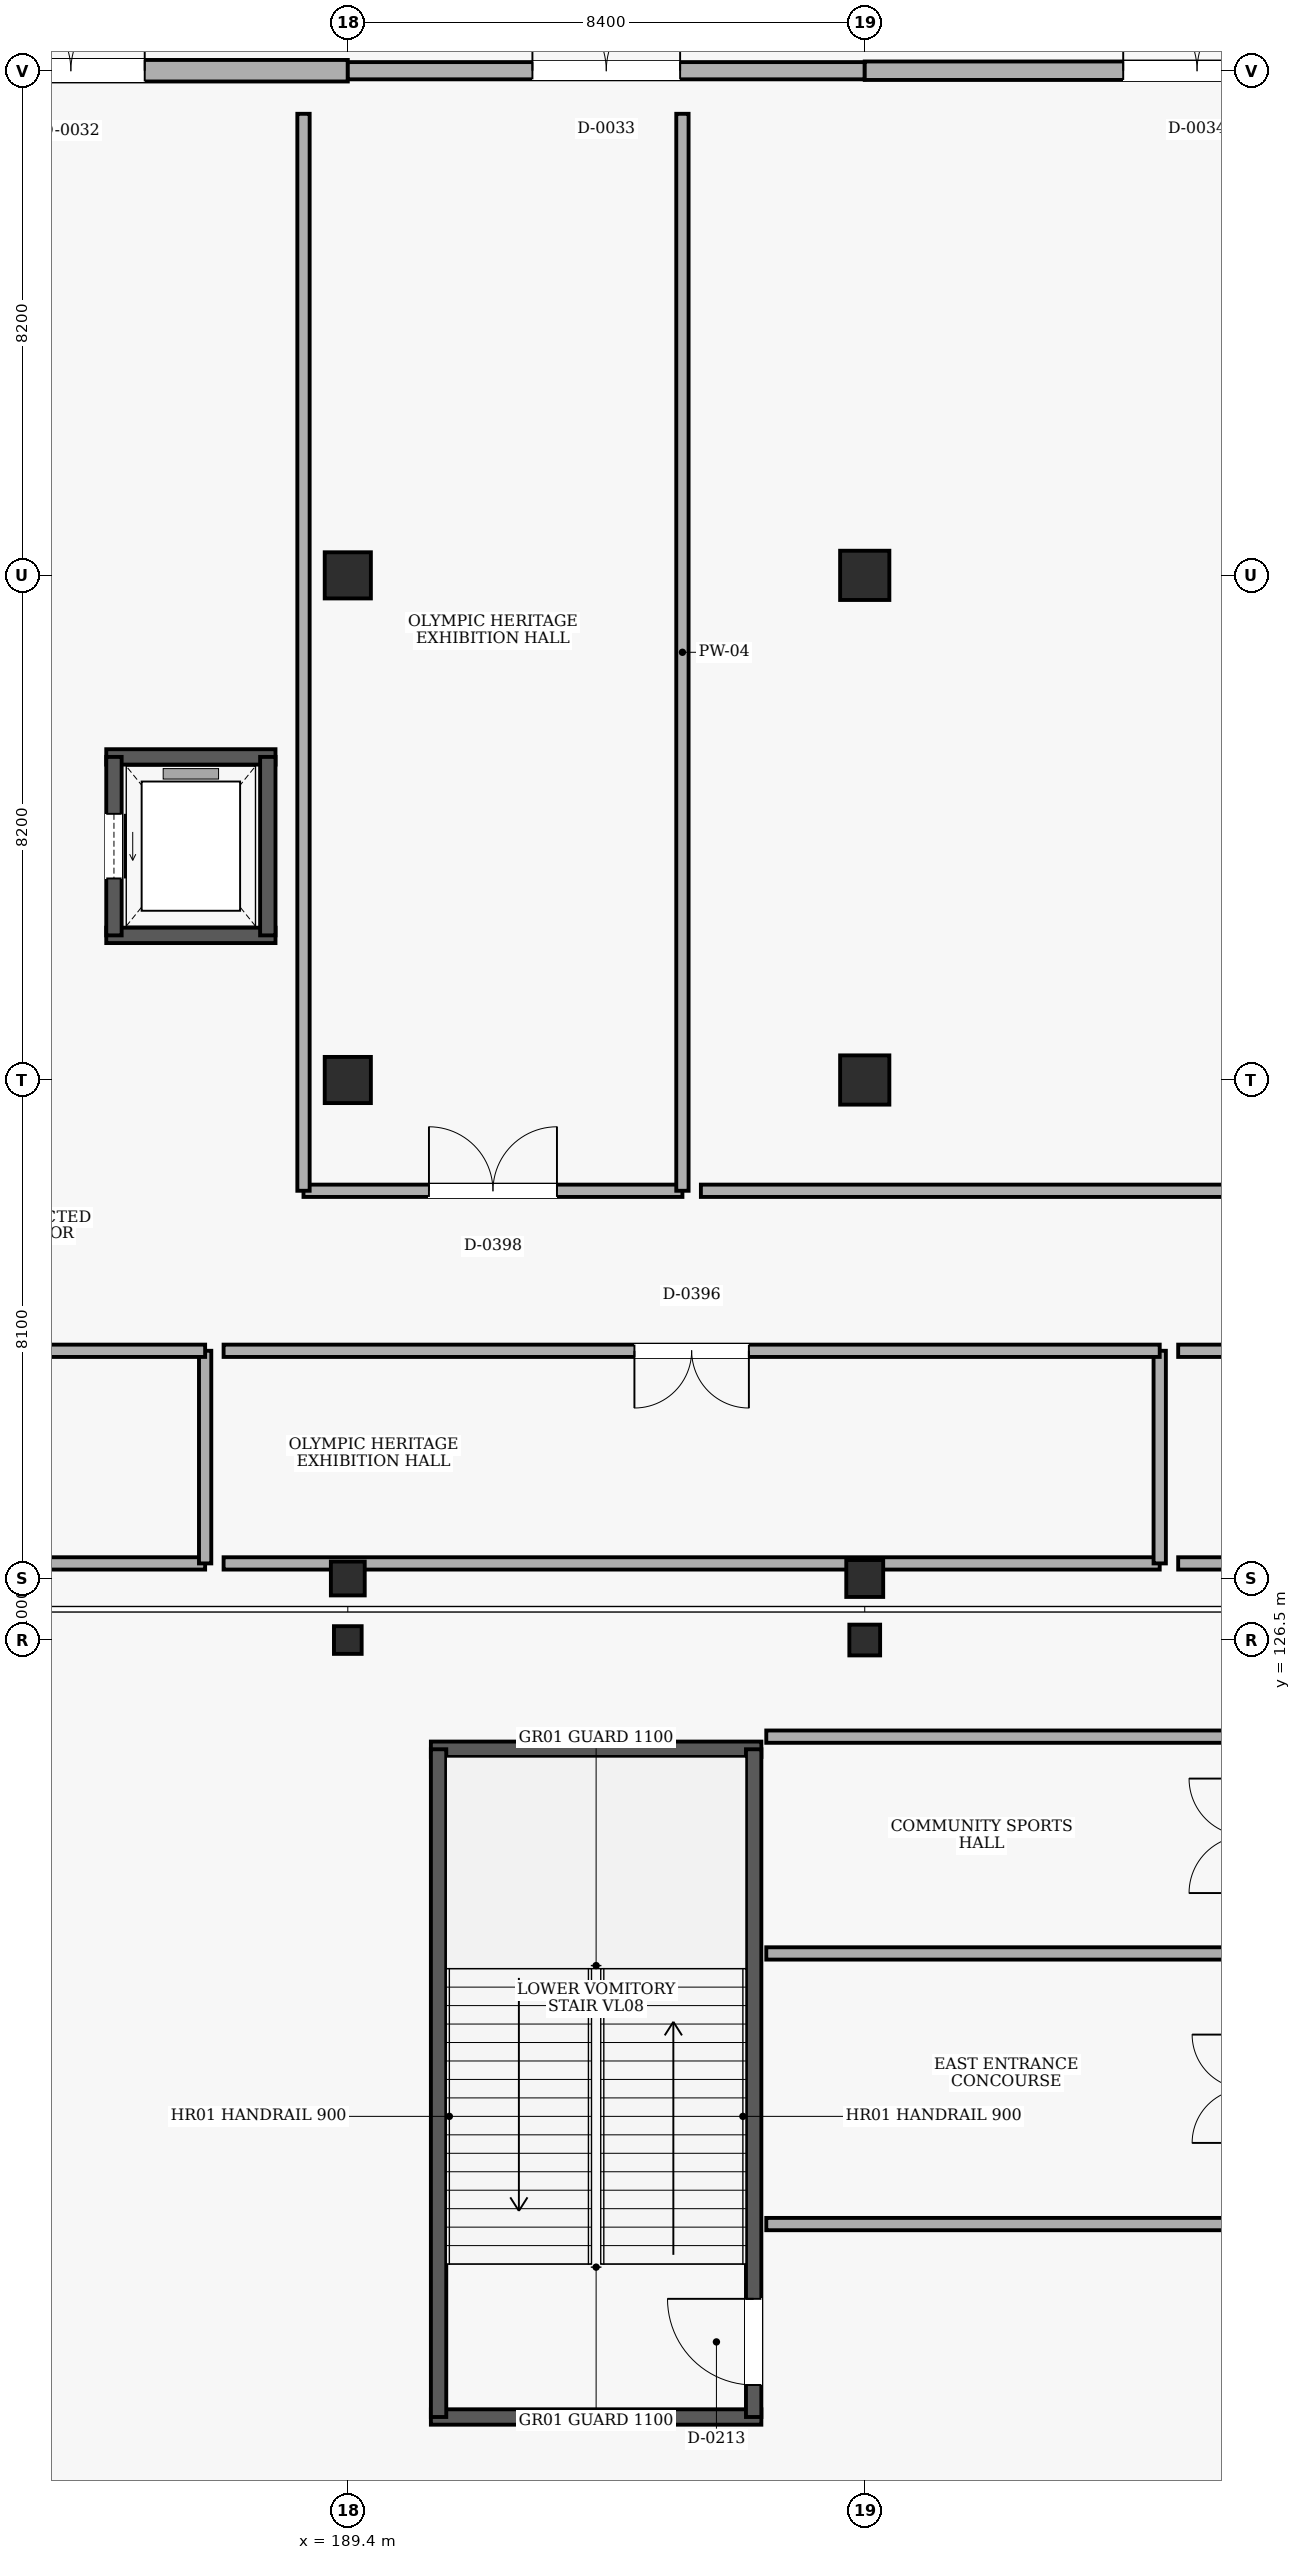
"""IFC4 building model, lengths in metres.
Left out: names, types, materials, properties, quantities, classifications, styles, units other than length and angle.
Written with IfcOpenShell. Run it as: python <this file> out.ifc"""

import sys

from ifc_helpers import new_model, si_unit, direction, frame, frame_2d, origin, origin_2d, place, context, subcontext, project, spatial, rectangle, extrude, element, fill, save


model = new_model("IFC4")
c1 = context("Model", 3, precision=1e-05, world=origin(), true_north=direction((0.0, 1.0)))
c2 = subcontext(c1, "Body", "Model", "MODEL_VIEW")
j1 = project(units=[si_unit("LENGTHUNIT", "METRE"), si_unit("PLANEANGLEUNIT", "RADIAN")], contexts=[c1])
p1 = place(None, origin())
s1 = spatial("IfcSite", under=j1, at=p1, CompositionType="ELEMENT")
p2 = place(p1, origin())
s2 = spatial("IfcBuilding", under=s1, at=p2, CompositionType="ELEMENT")
p3 = place(p2, origin())
s3 = spatial("IfcBuildingStorey", under=s2, at=p3, CompositionType="ELEMENT", Elevation=0.0)
p4 = place(p3, frame((189.4, 126.5, 0.0), z_axis=(0.0, 0.0, 1.0), x_axis=(1.0, 0.0, 0.0)))
e1 = element("IfcColumn", 1, at=p4, inside=s3, PredefinedType="COLUMN", context=c2, shape_type="SweptSolid", body=[
    extrude(rectangle(XDim=0.45, YDim=0.45, at=origin_2d()), origin(), (0.0, 0.0, 1.0), 5.4),
])
p5 = place(p3, frame((189.4, 127.5, 0.0), z_axis=(0.0, 0.0, 1.0), x_axis=(1.0, 0.0, 0.0)))
e2 = element("IfcColumn", 2, at=p5, inside=s3, PredefinedType="COLUMN", context=c2, shape_type="SweptSolid", body=[
    extrude(rectangle(XDim=0.55, YDim=0.55, at=origin_2d()), origin(), (0.0, 0.0, 1.0), 5.4),
])
for number, where, z_axis, x_axis in (
    (3, (189.4, 135.6, 0.0), (0.0, 0.0, 1.0), (1.0, 0.0, 0.0)),
    (4, (189.4, 143.8, 0.0), (0.0, 0.0, 1.0), (1.0, 0.0, 0.0)),
):
    element("IfcColumn", number, at=place(p3, frame(where, z_axis=z_axis, x_axis=x_axis)), inside=s3, PredefinedType="COLUMN", context=c2, shape_type="SweptSolid", body=[
        extrude(rectangle(XDim=0.75, YDim=0.75, at=origin_2d()), origin(), (0.0, 0.0, 1.0), 5.4),
    ])
p6 = place(p3, frame((197.8, 126.5, 0.0), z_axis=(0.0, 0.0, 1.0), x_axis=(1.0, 0.0, 0.0)))
e5 = element("IfcColumn", 5, at=p6, inside=s3, PredefinedType="COLUMN", context=c2, shape_type="SweptSolid", body=[
    extrude(rectangle(XDim=0.5, YDim=0.5, at=origin_2d()), origin(), (0.0, 0.0, 1.0), 5.4),
])
p7 = place(p3, frame((197.8, 127.5, 0.0), z_axis=(0.0, 0.0, 1.0), x_axis=(1.0, 0.0, 0.0)))
e6 = element("IfcColumn", 6, at=p7, inside=s3, PredefinedType="COLUMN", context=c2, shape_type="SweptSolid", body=[
    extrude(rectangle(XDim=0.6, YDim=0.6, at=origin_2d()), origin(), (0.0, 0.0, 1.0), 5.4),
])
for number, where, z_axis, x_axis in (
    (7, (197.8, 135.6, 0.0), (0.0, 0.0, 1.0), (1.0, 0.0, 0.0)),
    (8, (197.8, 143.8, 0.0), (0.0, 0.0, 1.0), (1.0, 0.0, 0.0)),
):
    element("IfcColumn", number, at=place(p3, frame(where, z_axis=z_axis, x_axis=x_axis)), inside=s3, PredefinedType="COLUMN", context=c2, shape_type="SweptSolid", body=[
        extrude(rectangle(XDim=0.8, YDim=0.8, at=origin_2d()), origin(), (0.0, 0.0, 1.0), 5.4),
    ])
p8 = place(p3, frame((180.4, 152.0, 0.0), z_axis=(0.0, 0.0, 1.0), x_axis=(1.0, 0.0, 0.0)))
e9 = element("IfcWall", 9, at=p8, inside=s3, PredefinedType="SOLIDWALL", context=c2, shape_type="SweptSolid", body=[
    extrude(rectangle(XDim=9.0, YDim=0.35, at=frame_2d((4.5, 0.0))), origin(), (0.0, 0.0, 1.0), 5.08),
])
p9 = place(p8, frame((3.3, 0.0, 0.0)))
e10 = element("IfcOpeningElement", 10, at=p9, cuts=e9, PredefinedType="OPENING", context=c2, shape_type="SweptSolid", body=[
    extrude(rectangle(XDim=2.4, YDim=2.2, at=frame_2d((1.2, 1.1))), frame((0.0, 0.185, 0.0), z_axis=(0.0, -1.0, 0.0), x_axis=(1.0, 0.0, 0.0)), (0.0, 0.0, 1.0), 0.37),
])
p10 = place(p3, frame((189.4, 152.0, 0.0), z_axis=(0.0, 0.0, 1.0), x_axis=(1.0, 0.0, 0.0)))
e11 = element("IfcWall", 11, at=p10, inside=s3, PredefinedType="SOLIDWALL", context=c2, shape_type="SweptSolid", body=[
    extrude(rectangle(XDim=8.4, YDim=0.28, at=frame_2d((4.2, 0.0))), origin(), (0.0, 0.0, 1.0), 5.08),
])
p11 = place(p10, frame((3.0, 0.0, 0.0)))
e12 = element("IfcOpeningElement", 12, at=p11, cuts=e11, PredefinedType="OPENING", context=c2, shape_type="SweptSolid", body=[
    extrude(rectangle(XDim=2.4, YDim=2.2, at=frame_2d((1.2, 1.1))), frame((0.0, 0.15, 0.0), z_axis=(0.0, -1.0, 0.0), x_axis=(1.0, 0.0, 0.0)), (0.0, 0.0, 1.0), 0.3),
])
p12 = place(p3, frame((197.8, 152.0, 0.0), z_axis=(0.0, 0.0, 1.0), x_axis=(1.0, 0.0, 0.0)))
e13 = element("IfcWall", 13, at=p12, inside=s3, PredefinedType="SOLIDWALL", context=c2, shape_type="SweptSolid", body=[
    extrude(rectangle(XDim=10.8, YDim=0.3, at=frame_2d((5.4, 0.0))), origin(), (0.0, 0.0, 1.0), 5.08),
])
p13 = place(p12, frame((4.2, 0.0, 0.0)))
e14 = element("IfcOpeningElement", 14, at=p13, cuts=e13, PredefinedType="OPENING", context=c2, shape_type="SweptSolid", body=[
    extrude(rectangle(XDim=2.4, YDim=2.2, at=frame_2d((1.2, 1.1))), frame((0.0, 0.16, 0.0), z_axis=(0.0, -1.0, 0.0), x_axis=(1.0, 0.0, 0.0)), (0.0, 0.0, 1.0), 0.32),
])
for number, where, z_axis, x_axis in (
    (15, (190.75, 113.875, 0.0), (0.0, 0.0, 1.0), (1.0, 0.0, 0.0)),
    (16, (196.12, 124.725, 0.0), (0.0, 0.0, 1.0), (-1.0, 0.0, 0.0)),
):
    element("IfcWall", number, at=place(p3, frame(where, z_axis=z_axis, x_axis=x_axis)), inside=s3, PredefinedType="SHEAR", context=c2, shape_type="SweptSolid", body=[
        extrude(rectangle(XDim=5.37, YDim=0.25, at=frame_2d((2.685, 0.0))), origin(), (0.0, 0.0, 1.0), 5.08),
    ])
p14 = place(p3, frame((190.875, 113.875, 0.0), z_axis=(0.0, 0.0, 1.0), x_axis=(0.0, 1.0, 0.0)))
e17 = element("IfcWall", 17, at=p14, inside=s3, PredefinedType="SHEAR", context=c2, shape_type="SweptSolid", body=[
    extrude(rectangle(XDim=10.85, YDim=0.25, at=frame_2d((5.425, 0.0))), origin(), (0.0, 0.0, 1.0), 5.08),
])
p15 = place(p3, frame((195.995, 113.875, 0.0), z_axis=(0.0, 0.0, 1.0), x_axis=(0.0, 1.0, 0.0)))
e18 = element("IfcWall", 18, at=p15, inside=s3, PredefinedType="SHEAR", context=c2, shape_type="SweptSolid", body=[
    extrude(rectangle(XDim=10.85, YDim=0.25, at=frame_2d((5.425, 0.0))), origin(), (0.0, 0.0, 1.0), 5.08),
])
p16 = place(p15, frame((0.52, 0.0, 0.0)))
e19 = element("IfcOpeningElement", 19, at=p16, cuts=e18, PredefinedType="OPENING", context=c2, shape_type="SweptSolid", body=[
    extrude(rectangle(XDim=1.4, YDim=2.15, at=frame_2d((0.7, 1.075))), frame((0.0, 0.135, 0.0), z_axis=(0.0, -1.0, 0.0), x_axis=(1.0, 0.0, 0.0)), (0.0, 0.0, 1.0), 0.27),
])
for number, where, z_axis, x_axis in (
    (20, (185.475, 137.95, 0.0), (0.0, 0.0, 1.0), (1.0, 0.0, 0.0)),
    (21, (188.225, 140.85, 0.0), (0.0, 0.0, 1.0), (-1.0, 0.0, 0.0)),
):
    element("IfcWall", number, at=place(p3, frame(where, z_axis=z_axis, x_axis=x_axis)), inside=s3, PredefinedType="SHEAR", context=c2, shape_type="SweptSolid", body=[
        extrude(rectangle(XDim=2.75, YDim=0.25, at=frame_2d((1.375, 0.0))), origin(), (0.0, 0.0, 1.0), 5.08),
    ])
p17 = place(p3, frame((185.6, 140.85, 0.0), z_axis=(0.0, 0.0, 1.0), x_axis=(0.0, -1.0, 0.0)))
e22 = element("IfcWall", 22, at=p17, inside=s3, PredefinedType="SHEAR", context=c2, shape_type="SweptSolid", body=[
    extrude(rectangle(XDim=2.9, YDim=0.25, at=frame_2d((1.45, 0.0))), origin(), (0.0, 0.0, 1.0), 5.08),
])
p18 = place(p17, frame((0.925, 0.0, 0.0)))
e23 = element("IfcOpeningElement", 23, at=p18, cuts=e22, PredefinedType="OPENING", context=c2, shape_type="SweptSolid", body=[
    extrude(rectangle(XDim=1.05, YDim=2.15, at=frame_2d((0.525, 1.075))), frame((0.0, 0.135, 0.0), z_axis=(0.0, -1.0, 0.0), x_axis=(1.0, 0.0, 0.0)), (0.0, 0.0, 1.0), 0.27),
])
p19 = place(p3, frame((188.1, 137.95, 0.0), z_axis=(0.0, 0.0, 1.0), x_axis=(0.0, 1.0, 0.0)))
e24 = element("IfcWall", 24, at=p19, inside=s3, PredefinedType="SHEAR", context=c2, shape_type="SweptSolid", body=[
    extrude(rectangle(XDim=2.9, YDim=0.25, at=frame_2d((1.45, 0.0))), origin(), (0.0, 0.0, 1.0), 5.08),
])
for number, where, z_axis, x_axis in (
    (25, (196.2, 117.01, 0.0), (0.0, 0.0, 1.0), (1.0, 0.0, 0.0)),
    (26, (204.0, 121.407, 0.0), (0.0, 0.0, 1.0), (-1.0, 0.0, 0.0)),
    (27, (204.0, 124.93, 0.0), (0.0, 0.0, 1.0), (-1.0, 0.0, 0.0)),
):
    element("IfcWall", number, at=place(p3, frame(where, z_axis=z_axis, x_axis=x_axis)), inside=s3, PredefinedType="PARTITIONING", context=c2, shape_type="SweptSolid", body=[
        extrude(rectangle(XDim=7.8, YDim=0.2, at=frame_2d((3.9, 0.0))), origin(), (0.0, 0.0, 1.0), 5.08),
    ])
p20 = place(p3, frame((171.87, 127.745, 0.0), z_axis=(0.0, 0.0, 1.0), x_axis=(1.0, 0.0, 0.0)))
e28 = element("IfcWall", 28, at=p20, inside=s3, PredefinedType="PARTITIONING", context=c2, shape_type="SweptSolid", body=[
    extrude(rectangle(XDim=15.212, YDim=0.2, at=frame_2d((7.606, 0.0))), origin(), (0.0, 0.0, 1.0), 4.26),
])
p21 = place(p3, frame((187.082, 127.745, 0.0), z_axis=(0.0, 0.0, 1.0), x_axis=(0.0, 1.0, 0.0)))
e29 = element("IfcWall", 29, at=p21, inside=s3, PredefinedType="PARTITIONING", context=c2, shape_type="SweptSolid", body=[
    extrude(rectangle(XDim=3.455, YDim=0.2, at=frame_2d((1.728, 0.0))), origin(), (0.0, 0.0, 1.0), 5.08),
])
p22 = place(p3, frame((187.082, 131.2, 0.0), z_axis=(0.0, 0.0, 1.0), x_axis=(-1.0, 0.0, 0.0)))
e30 = element("IfcWall", 30, at=p22, inside=s3, PredefinedType="PARTITIONING", context=c2, shape_type="SweptSolid", body=[
    extrude(rectangle(XDim=15.212, YDim=0.2, at=frame_2d((7.606, 0.0))), origin(), (0.0, 0.0, 1.0), 5.08),
])
p23 = place(p22, frame((6.726, 0.0, 0.0)))
e31 = element("IfcOpeningElement", 31, at=p23, cuts=e30, PredefinedType="OPENING", context=c2, shape_type="SweptSolid", body=[
    extrude(rectangle(XDim=1.76, YDim=2.25, at=frame_2d((0.88, 1.125))), frame((0.0, 0.11, 0.0), z_axis=(0.0, -1.0, 0.0), x_axis=(1.0, 0.0, 0.0)), (0.0, 0.0, 1.0), 0.22),
])
p24 = place(p3, frame((187.382, 127.745, 0.0), z_axis=(0.0, 0.0, 1.0), x_axis=(1.0, 0.0, 0.0)))
e32 = element("IfcWall", 32, at=p24, inside=s3, PredefinedType="PARTITIONING", context=c2, shape_type="SweptSolid", body=[
    extrude(rectangle(XDim=15.212, YDim=0.2, at=frame_2d((7.606, 0.0))), origin(), (0.0, 0.0, 1.0), 4.26),
])
p25 = place(p3, frame((202.593, 127.745, 0.0), z_axis=(0.0, 0.0, 1.0), x_axis=(0.0, 1.0, 0.0)))
e33 = element("IfcWall", 33, at=p25, inside=s3, PredefinedType="PARTITIONING", context=c2, shape_type="SweptSolid", body=[
    extrude(rectangle(XDim=3.455, YDim=0.2, at=frame_2d((1.728, 0.0))), origin(), (0.0, 0.0, 1.0), 5.08),
])
p26 = place(p3, frame((202.593, 131.2, 0.0), z_axis=(0.0, 0.0, 1.0), x_axis=(-1.0, 0.0, 0.0)))
e34 = element("IfcWall", 34, at=p26, inside=s3, PredefinedType="PARTITIONING", context=c2, shape_type="SweptSolid", body=[
    extrude(rectangle(XDim=15.212, YDim=0.2, at=frame_2d((7.606, 0.0))), origin(), (0.0, 0.0, 1.0), 5.08),
])
p27 = place(p26, frame((6.676, 0.0, 0.0)))
e35 = element("IfcOpeningElement", 35, at=p27, cuts=e34, PredefinedType="OPENING", context=c2, shape_type="SweptSolid", body=[
    extrude(rectangle(XDim=1.86, YDim=2.3, at=frame_2d((0.93, 1.15))), frame((0.0, 0.11, 0.0), z_axis=(0.0, -1.0, 0.0), x_axis=(1.0, 0.0, 0.0)), (0.0, 0.0, 1.0), 0.22),
])
p28 = place(p3, frame((202.893, 127.745, 0.0), z_axis=(0.0, 0.0, 1.0), x_axis=(1.0, 0.0, 0.0)))
e36 = element("IfcWall", 36, at=p28, inside=s3, PredefinedType="PARTITIONING", context=c2, shape_type="SweptSolid", body=[
    extrude(rectangle(XDim=15.212, YDim=0.2, at=frame_2d((7.606, 0.0))), origin(), (0.0, 0.0, 1.0), 4.21),
])
p29 = place(p3, frame((218.105, 131.2, 0.0), z_axis=(0.0, 0.0, 1.0), x_axis=(-1.0, 0.0, 0.0)))
e37 = element("IfcWall", 37, at=p29, inside=s3, PredefinedType="PARTITIONING", context=c2, shape_type="SweptSolid", body=[
    extrude(rectangle(XDim=15.212, YDim=0.2, at=frame_2d((7.606, 0.0))), origin(), (0.0, 0.0, 1.0), 5.08),
])
p30 = place(p29, frame((6.626, 0.0, 0.0)))
e38 = element("IfcOpeningElement", 38, at=p30, cuts=e37, PredefinedType="OPENING", context=c2, shape_type="SweptSolid", body=[
    extrude(rectangle(XDim=1.96, YDim=2.3, at=frame_2d((0.98, 1.15))), frame((0.0, 0.11, 0.0), z_axis=(0.0, -1.0, 0.0), x_axis=(1.0, 0.0, 0.0)), (0.0, 0.0, 1.0), 0.22),
])
p31 = place(p3, frame((188.68, 133.8, 0.0), z_axis=(0.0, 0.0, 1.0), x_axis=(1.0, 0.0, 0.0)))
e39 = element("IfcWall", 39, at=p31, inside=s3, PredefinedType="PARTITIONING", context=c2, shape_type="SweptSolid", body=[
    extrude(rectangle(XDim=6.157, YDim=0.2, at=frame_2d((3.079, 0.0))), origin(), (0.0, 0.0, 1.0), 5.08),
])
p32 = place(p31, frame((2.039, 0.0, 0.0)))
e40 = element("IfcOpeningElement", 40, at=p32, cuts=e39, PredefinedType="OPENING", context=c2, shape_type="SweptSolid", body=[
    extrude(rectangle(XDim=2.08, YDim=2.35, at=frame_2d((1.04, 1.175))), frame((0.0, 0.11, 0.0), z_axis=(0.0, -1.0, 0.0), x_axis=(1.0, 0.0, 0.0)), (0.0, 0.0, 1.0), 0.22),
])
for number, where, z_axis, x_axis in (
    (41, (194.837, 133.8, 0.0), (0.0, 0.0, 1.0), (0.0, 1.0, 0.0)),
    (42, (188.68, 151.3, 0.0), (0.0, 0.0, 1.0), (0.0, -1.0, 0.0)),
):
    element("IfcWall", number, at=place(p3, frame(where, z_axis=z_axis, x_axis=x_axis)), inside=s3, PredefinedType="PARTITIONING", context=c2, shape_type="SweptSolid", body=[
        extrude(rectangle(XDim=17.5, YDim=0.2, at=frame_2d((8.75, 0.0))), origin(), (0.0, 0.0, 1.0), 5.08),
    ])
p33 = place(p3, frame((195.137, 133.8, 0.0), z_axis=(0.0, 0.0, 1.0), x_axis=(1.0, 0.0, 0.0)))
e43 = element("IfcWall", 43, at=p33, inside=s3, PredefinedType="PARTITIONING", context=c2, shape_type="SweptSolid", body=[
    extrude(rectangle(XDim=22.968, YDim=0.2, at=frame_2d((11.484, 0.0))), origin(), (0.0, 0.0, 1.0), 5.08),
])
p34 = place(p33, frame((8.795, 0.0, 0.0)))
e44 = element("IfcOpeningElement", 44, at=p34, cuts=e43, PredefinedType="OPENING", context=c2, shape_type="SweptSolid", body=[
    extrude(rectangle(XDim=2.16, YDim=2.35, at=frame_2d((1.08, 1.175))), frame((0.0, 0.11, 0.0), z_axis=(0.0, -1.0, 0.0), x_axis=(1.0, 0.0, 0.0)), (0.0, 0.0, 1.0), 0.22),
])
p35 = place(p9, origin())
e45 = element("IfcDoor", 45, at=p35, inside=s3, OperationType="DOUBLE_DOOR_SINGLE_SWING", PredefinedType="DOOR", context=c2, shape_type="SweptSolid", body=[
    extrude(rectangle(XDim=2.4, YDim=2.2, at=frame_2d((1.2, 1.1))), frame((0.0, 0.025, 0.0), z_axis=(0.0, -1.0, 0.0), x_axis=(1.0, 0.0, 0.0)), (0.0, 0.0, 1.0), 0.05),
])
fill(e10, e45)
p36 = place(p11, origin())
e46 = element("IfcDoor", 46, at=p36, inside=s3, OperationType="DOUBLE_DOOR_SINGLE_SWING", PredefinedType="DOOR", context=c2, shape_type="SweptSolid", body=[
    extrude(rectangle(XDim=2.4, YDim=2.2, at=frame_2d((1.2, 1.1))), frame((0.0, 0.025, 0.0), z_axis=(0.0, -1.0, 0.0), x_axis=(1.0, 0.0, 0.0)), (0.0, 0.0, 1.0), 0.05),
])
fill(e12, e46)
p37 = place(p13, origin())
e47 = element("IfcDoor", 47, at=p37, inside=s3, OperationType="DOUBLE_DOOR_SINGLE_SWING", PredefinedType="DOOR", context=c2, shape_type="SweptSolid", body=[
    extrude(rectangle(XDim=2.4, YDim=2.2, at=frame_2d((1.2, 1.1))), frame((0.0, 0.025, 0.0), z_axis=(0.0, -1.0, 0.0), x_axis=(1.0, 0.0, 0.0)), (0.0, 0.0, 1.0), 0.05),
])
fill(e14, e47)
p38 = place(p16, frame((1.4, 0.0, 0.0), z_axis=(0.0, 0.0, 1.0), x_axis=(-1.0, 0.0, 0.0)))
e48 = element("IfcDoor", 48, at=p38, inside=s3, OperationType="SINGLE_SWING_LEFT", PredefinedType="DOOR", context=c2, shape_type="SweptSolid", body=[
    extrude(rectangle(XDim=1.4, YDim=2.15, at=frame_2d((0.7, 1.075))), frame((0.0, 0.025, 0.0), z_axis=(0.0, -1.0, 0.0), x_axis=(1.0, 0.0, 0.0)), (0.0, 0.0, 1.0), 0.05),
])
fill(e19, e48)
p39 = place(p18, origin())
e49 = element("IfcDoor", 49, at=p39, inside=s3, OperationType="SLIDING_TO_LEFT", PredefinedType="DOOR", context=c2, shape_type="SweptSolid", body=[
    extrude(rectangle(XDim=1.05, YDim=2.15, at=frame_2d((0.525, 1.075))), frame((0.0, 0.025, 0.0), z_axis=(0.0, -1.0, 0.0), x_axis=(1.0, 0.0, 0.0)), (0.0, 0.0, 1.0), 0.05),
])
fill(e23, e49)
p40 = place(p27, origin())
e50 = element("IfcDoor", 50, at=p40, inside=s3, OperationType="DOUBLE_DOOR_SINGLE_SWING", PredefinedType="DOOR", context=c2, shape_type="SweptSolid", body=[
    extrude(rectangle(XDim=1.86, YDim=2.3, at=frame_2d((0.93, 1.15))), frame((0.0, 0.025, 0.0), z_axis=(0.0, -1.0, 0.0), x_axis=(1.0, 0.0, 0.0)), (0.0, 0.0, 1.0), 0.05),
])
fill(e35, e50)
p41 = place(p32, origin())
e51 = element("IfcDoor", 51, at=p41, inside=s3, OperationType="DOUBLE_DOOR_SINGLE_SWING", PredefinedType="DOOR", context=c2, shape_type="SweptSolid", body=[
    extrude(rectangle(XDim=2.08, YDim=2.35, at=frame_2d((1.04, 1.175))), frame((0.0, 0.025, 0.0), z_axis=(0.0, -1.0, 0.0), x_axis=(1.0, 0.0, 0.0)), (0.0, 0.0, 1.0), 0.05),
])
fill(e40, e51)
save(model, sys.argv[1])
